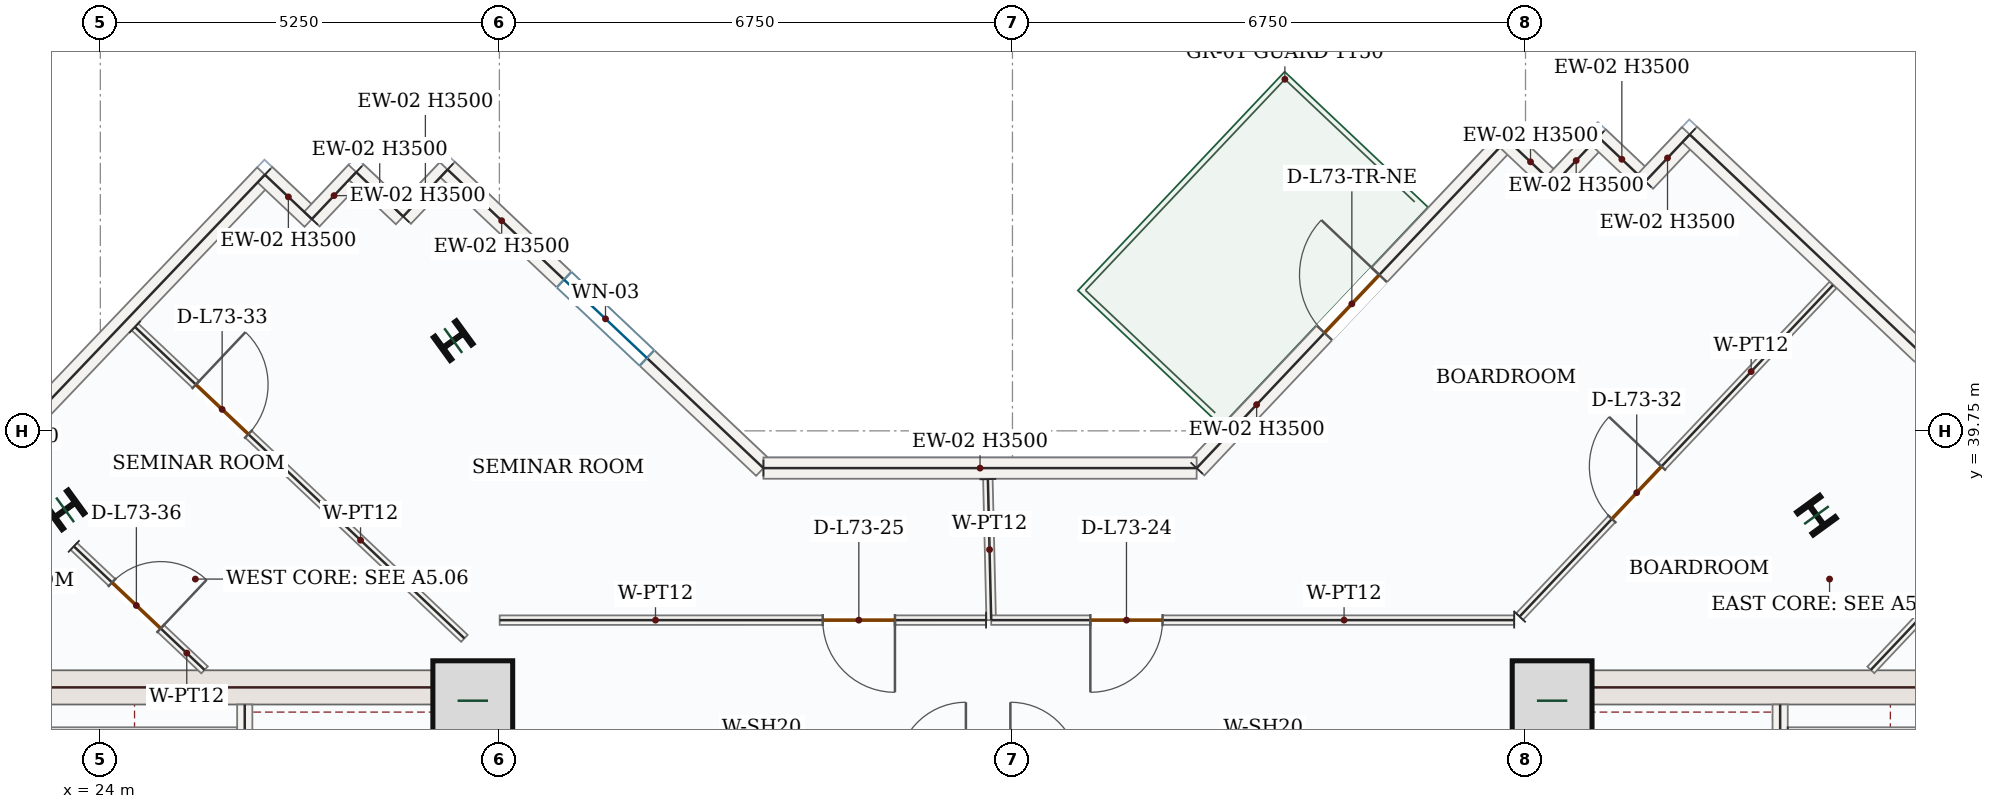
"""IFC4 building model, lengths in metres.
Left out: names, types, materials, properties, quantities, classifications, styles, units other than length and angle.
Written with IfcOpenShell. Run it as: python <this file> out.ifc"""

import sys

from ifc_helpers import new_model, si_unit, direction, frame, frame_2d, origin, origin_2d, place, context, subcontext, project, spatial, rectangle, i_section, extrude, source, transform, mapped, element, fill, save


model = new_model("IFC4")
c1 = context("Model", 3, precision=1e-05, world=origin(), true_north=direction((0.0, 1.0)))
c2 = subcontext(c1, "Body", "Model", "MODEL_VIEW")
j1 = project(units=[si_unit("LENGTHUNIT", "METRE"), si_unit("PLANEANGLEUNIT", "RADIAN")], contexts=[c1])
p1 = place(None, origin())
s1 = spatial("IfcSite", under=j1, at=p1, CompositionType="ELEMENT")
p2 = place(p1, origin())
s2 = spatial("IfcBuilding", under=s1, at=p2, CompositionType="ELEMENT")
p3 = place(p2, frame((0.0, 0.0, 302.85)))
s3 = spatial("IfcBuildingStorey", under=s2, at=p3, CompositionType="ELEMENT", Elevation=302.85)
p4 = place(p3, frame((29.025, 28.05, 0.0), z_axis=(0.0, 0.0, 1.0), x_axis=(0.0, 1.0, 0.0)))
e1 = element("IfcWall", 1, at=p4, inside=s3, PredefinedType="SHEAR", context=c2, shape_type="SweptSolid", body=[
    extrude(rectangle(XDim=8.55, YDim=0.45, at=frame_2d((4.275, 0.0))), origin(), (0.0, 0.0, 1.0), 3.5),
])
p5 = place(p4, frame((1.5, 0.0, 0.0)))
e2 = element("IfcOpeningElement", 2, at=p5, cuts=e1, PredefinedType="OPENING", context=c2, shape_type="SweptSolid", body=[
    extrude(rectangle(XDim=1.1, YDim=2.2, at=frame_2d((0.55, 1.1))), frame((0.0, 0.235, 0.0), z_axis=(0.0, -1.0, 0.0), x_axis=(1.0, 0.0, 0.0)), (0.0, 0.0, 1.0), 0.47),
])
m1 = source(origin(), c2, "Body", "SweptSolid", [
    extrude(rectangle(XDim=7.1, YDim=0.45, at=frame_2d((3.55, 0.0))), origin(), (0.0, 0.0, 1.0), 3.5),
])
p6 = place(p3, frame((21.7, 36.375, 0.0), z_axis=(0.0, 0.0, 1.0), x_axis=(1.0, 0.0, 0.0)))
e3 = element("IfcWall", 3, at=p6, inside=s3, PredefinedType="SHEAR", context=c2, shape_type="MappedRepresentation", body=[
    mapped(m1, transform((0.0, 0.0, 0.0), x_axis=(1.0, 0.0, 0.0), y_axis=(0.0, 1.0, 0.0), z_axis=(0.0, 0.0, 1.0), scale=1.0)),
])
p7 = place(p3, frame((42.975, 28.05, 0.0), z_axis=(0.0, 0.0, 1.0), x_axis=(0.0, 1.0, 0.0)))
e4 = element("IfcWall", 4, at=p7, inside=s3, PredefinedType="SHEAR", context=c2, shape_type="SweptSolid", body=[
    extrude(rectangle(XDim=8.55, YDim=0.45, at=frame_2d((4.275, 0.0))), origin(), (0.0, 0.0, 1.0), 3.5),
])
p8 = place(p7, frame((1.5, 0.0, 0.0)))
e5 = element("IfcOpeningElement", 5, at=p8, cuts=e4, PredefinedType="OPENING", context=c2, shape_type="SweptSolid", body=[
    extrude(rectangle(XDim=1.1, YDim=2.2, at=frame_2d((0.55, 1.1))), frame((0.0, 0.235, 0.0), z_axis=(0.0, -1.0, 0.0), x_axis=(1.0, 0.0, 0.0)), (0.0, 0.0, 1.0), 0.47),
])
p9 = place(p3, frame((43.2, 36.375, 0.0), z_axis=(0.0, 0.0, 1.0), x_axis=(1.0, 0.0, 0.0)))
e6 = element("IfcWall", 6, at=p9, inside=s3, PredefinedType="SHEAR", context=c2, shape_type="MappedRepresentation", body=[
    mapped(m1, transform((0.0, 0.0, 0.0), x_axis=(1.0, 0.0, 0.0), y_axis=(0.0, 1.0, 0.0), z_axis=(0.0, 0.0, 1.0), scale=1.0)),
])
m2 = source(origin(), c2, "Body", "SweptSolid", [
    extrude(rectangle(XDim=1.05, YDim=1.05, at=origin_2d()), origin(), (0.0, 0.0, 1.0), 3.75),
])
for number, where, z_axis, x_axis in (
    (7, (28.9, 36.2, 0.0), (0.0, 0.0, 1.0), (1.0, 0.0, 0.0)),
    (8, (43.1, 36.2, 0.0), (0.0, 0.0, 1.0), (1.0, 0.0, 0.0)),
):
    element("IfcColumn", number, at=place(p3, frame(where, z_axis=z_axis, x_axis=x_axis)), inside=s3, PredefinedType="COLUMN", context=c2, shape_type="MappedRepresentation", body=[
        mapped(m2, transform((0.0, 0.0, 0.0), x_axis=(1.0, 0.0, 0.0), y_axis=(0.0, 1.0, 0.0), z_axis=(0.0, 0.0, 1.0), scale=1.0)),
    ])
m3 = source(origin(), c2, "Body", "SweptSolid", [
    extrude(i_section(OverallWidth=0.374, OverallDepth=0.372, WebThickness=0.016, FlangeThickness=0.026, FilletRadius=0.018, at=origin_2d()), origin(), (0.0, 0.0, 1.0), 3.75),
])
for number, where, z_axis, x_axis in (
    (9, (46.578, 38.641, 0.0), (0.0, 0.0, 1.0), (0.809, 0.588, 0.0)),
    (10, (28.643, 40.937, 0.0), (0.0, 0.0, 1.0), (-0.588, 0.809, 0.0)),
    (11, (23.536, 38.711, 0.0), (0.0, 0.0, 1.0), (-0.588, 0.809, 0.0)),
):
    element("IfcColumn", number, at=place(p3, frame(where, z_axis=z_axis, x_axis=x_axis)), inside=s3, PredefinedType="COLUMN", context=c2, shape_type="MappedRepresentation", body=[
        mapped(m3, transform((0.0, 0.0, 0.0), x_axis=(1.0, 0.0, 0.0), y_axis=(0.0, 1.0, 0.0), z_axis=(0.0, 0.0, 1.0), scale=1.0)),
    ])
p10 = place(p3, frame((38.423, 39.26, 0.0), z_axis=(0.0, 0.0, 1.0), x_axis=(0.686888766374, 0.72676256276, 0.0)))
e12 = element("IfcWall", 12, at=p10, inside=s3, PredefinedType="SOLIDWALL", context=c2, shape_type="SweptSolid", body=[
    extrude(rectangle(XDim=5.945, YDim=0.28, at=frame_2d((2.973, 0.0))), origin(), (0.0, 0.0, 1.0), 3.5),
])
p11 = place(p10, frame((2.448, 0.0, 0.0)))
e13 = element("IfcOpeningElement", 13, at=p11, cuts=e12, PredefinedType="OPENING", context=c2, shape_type="SweptSolid", body=[
    extrude(rectangle(XDim=1.05, YDim=2.15, at=frame_2d((0.525, 1.075))), frame((0.0, 0.15, 0.0), z_axis=(0.0, -1.0, 0.0), x_axis=(1.0, 0.0, 0.0)), (0.0, 0.0, 1.0), 0.3),
])
m4 = source(origin(), c2, "Body", "SweptSolid", [
    extrude(rectangle(XDim=0.85, YDim=0.28, at=frame_2d((0.425, 0.0))), origin(), (0.0, 0.0, 1.0), 3.5),
])
p12 = place(p3, frame((42.507, 43.581, 0.0), z_axis=(0.0, 0.0, 1.0), x_axis=(0.726790047388, -0.686859685101, 0.0)))
e14 = element("IfcWall", 14, at=p12, inside=s3, PredefinedType="SOLIDWALL", context=c2, shape_type="MappedRepresentation", body=[
    mapped(m4, transform((0.0, 0.0, 0.0), x_axis=(1.0, 0.0, 0.0), y_axis=(0.0, 1.0, 0.0), z_axis=(0.0, 0.0, 1.0), scale=1.0)),
])
m5 = source(origin(), c2, "Body", "SweptSolid", [
    extrude(rectangle(XDim=0.85, YDim=0.28, at=frame_2d((0.425, 0.0))), origin(), (0.0, 0.0, 1.0), 3.5),
])
p13 = place(p3, frame((43.125, 42.997, 0.0), z_axis=(0.0, 0.0, 1.0), x_axis=(0.687011382404, 0.726646654466, 0.0)))
e15 = element("IfcWall", 15, at=p13, inside=s3, PredefinedType="SOLIDWALL", context=c2, shape_type="MappedRepresentation", body=[
    mapped(m5, transform((0.0, 0.0, 0.0), x_axis=(1.0, 0.0, 0.0), y_axis=(0.0, 1.0, 0.0), z_axis=(0.0, 0.0, 1.0), scale=1.0)),
])
p14 = place(p3, frame((43.708, 43.615, 0.0), z_axis=(0.0, 0.0, 1.0), x_axis=(0.726790047388, -0.686859685101, 0.0)))
e16 = element("IfcWall", 16, at=p14, inside=s3, PredefinedType="SOLIDWALL", context=c2, shape_type="MappedRepresentation", body=[
    mapped(m4, transform((0.0, 0.0, 0.0), x_axis=(1.0, 0.0, 0.0), y_axis=(0.0, 1.0, 0.0), z_axis=(0.0, 0.0, 1.0), scale=1.0)),
])
p15 = place(p3, frame((44.326, 43.031, 0.0), z_axis=(0.0, 0.0, 1.0), x_axis=(0.687011382404, 0.726646654466, 0.0)))
e17 = element("IfcWall", 17, at=p15, inside=s3, PredefinedType="SOLIDWALL", context=c2, shape_type="MappedRepresentation", body=[
    mapped(m5, transform((0.0, 0.0, 0.0), x_axis=(1.0, 0.0, 0.0), y_axis=(0.0, 1.0, 0.0), z_axis=(0.0, 0.0, 1.0), scale=1.0)),
])
p16 = place(p3, frame((44.91, 43.649, 0.0), z_axis=(0.0, 0.0, 1.0), x_axis=(0.726772856404, -0.686877875022, 0.0)))
e18 = element("IfcWall", 18, at=p16, inside=s3, PredefinedType="SOLIDWALL", context=c2, shape_type="SweptSolid", body=[
    extrude(rectangle(XDim=9.92, YDim=0.28, at=frame_2d((4.96, 0.0))), origin(), (0.0, 0.0, 1.0), 3.5),
])
p17 = place(p16, frame((4.21, 0.0, 0.85)))
e19 = element("IfcOpeningElement", 19, at=p17, cuts=e18, PredefinedType="OPENING", context=c2, shape_type="SweptSolid", body=[
    extrude(rectangle(XDim=1.5, YDim=1.5, at=frame_2d((0.75, 0.75))), frame((0.0, 0.15, 0.0), z_axis=(0.0, -1.0, 0.0), x_axis=(1.0, 0.0, 0.0)), (0.0, 0.0, 1.0), 0.3),
])
m6 = source(origin(), c2, "Body", "SweptSolid", [
    extrude(rectangle(XDim=10.47, YDim=0.28, at=frame_2d((5.235, 0.0))), origin(), (0.0, 0.0, 1.0), 3.5),
])
p18 = place(p3, frame((18.94, 35.542, 0.0), z_axis=(0.0, 0.0, 1.0), x_axis=(0.690070788875, 0.723741878256, 0.0)))
e20 = element("IfcWall", 20, at=p18, inside=s3, PredefinedType="SOLIDWALL", context=c2, shape_type="MappedRepresentation", body=[
    mapped(m6, transform((0.0, 0.0, 0.0), x_axis=(1.0, 0.0, 0.0), y_axis=(0.0, 1.0, 0.0), z_axis=(0.0, 0.0, 1.0), scale=1.0)),
])
p19 = place(p3, frame((26.165, 43.12, 0.0), z_axis=(0.0, 0.0, 1.0), x_axis=(0.726790047388, -0.686859685101, 0.0)))
e21 = element("IfcWall", 21, at=p19, inside=s3, PredefinedType="SOLIDWALL", context=c2, shape_type="MappedRepresentation", body=[
    mapped(m4, transform((0.0, 0.0, 0.0), x_axis=(1.0, 0.0, 0.0), y_axis=(0.0, 1.0, 0.0), z_axis=(0.0, 0.0, 1.0), scale=1.0)),
])
p20 = place(p3, frame((26.783, 42.536, 0.0), z_axis=(0.0, 0.0, 1.0), x_axis=(0.687011382404, 0.726646654466, 0.0)))
e22 = element("IfcWall", 22, at=p20, inside=s3, PredefinedType="SOLIDWALL", context=c2, shape_type="MappedRepresentation", body=[
    mapped(m5, transform((0.0, 0.0, 0.0), x_axis=(1.0, 0.0, 0.0), y_axis=(0.0, 1.0, 0.0), z_axis=(0.0, 0.0, 1.0), scale=1.0)),
])
p21 = place(p3, frame((27.367, 43.154, 0.0), z_axis=(0.0, 0.0, 1.0), x_axis=(0.726790047388, -0.686859685101, 0.0)))
e23 = element("IfcWall", 23, at=p21, inside=s3, PredefinedType="SOLIDWALL", context=c2, shape_type="MappedRepresentation", body=[
    mapped(m4, transform((0.0, 0.0, 0.0), x_axis=(1.0, 0.0, 0.0), y_axis=(0.0, 1.0, 0.0), z_axis=(0.0, 0.0, 1.0), scale=1.0)),
])
p22 = place(p3, frame((27.984, 42.57, 0.0), z_axis=(0.0, 0.0, 1.0), x_axis=(0.687011382404, 0.726646654466, 0.0)))
e24 = element("IfcWall", 24, at=p22, inside=s3, PredefinedType="SOLIDWALL", context=c2, shape_type="MappedRepresentation", body=[
    mapped(m5, transform((0.0, 0.0, 0.0), x_axis=(1.0, 0.0, 0.0), y_axis=(0.0, 1.0, 0.0), z_axis=(0.0, 0.0, 1.0), scale=1.0)),
])
p23 = place(p3, frame((28.568, 43.188, 0.0), z_axis=(0.0, 0.0, 1.0), x_axis=(0.726765623086, -0.686885528382, 0.0)))
e25 = element("IfcWall", 25, at=p23, inside=s3, PredefinedType="SOLIDWALL", context=c2, shape_type="SweptSolid", body=[
    extrude(rectangle(XDim=5.718, YDim=0.28, at=frame_2d((2.859, 0.0))), origin(), (0.0, 0.0, 1.0), 3.5),
])
p24 = place(p23, frame((2.109, 0.0, 0.85)))
e26 = element("IfcOpeningElement", 26, at=p24, cuts=e25, PredefinedType="OPENING", context=c2, shape_type="SweptSolid", body=[
    extrude(rectangle(XDim=1.5, YDim=1.5, at=frame_2d((0.75, 0.75))), frame((0.0, 0.15, 0.0), z_axis=(0.0, -1.0, 0.0), x_axis=(1.0, 0.0, 0.0)), (0.0, 0.0, 1.0), 0.3),
])
m7 = source(origin(), c2, "Body", "SweptSolid", [
    extrude(rectangle(XDim=5.699, YDim=0.28, at=frame_2d((2.85, 0.0))), origin(), (0.0, 0.0, 1.0), 3.5),
])
p25 = place(p3, frame((32.724, 39.26, 0.0), z_axis=(0.0, 0.0, 1.0), x_axis=(1.0, 0.0, 0.0)))
e27 = element("IfcWall", 27, at=p25, inside=s3, PredefinedType="SOLIDWALL", context=c2, shape_type="MappedRepresentation", body=[
    mapped(m7, transform((0.0, 0.0, 0.0), x_axis=(1.0, 0.0, 0.0), y_axis=(0.0, 1.0, 0.0), z_axis=(0.0, 0.0, 1.0), scale=1.0)),
])
p26 = place(p3, frame((25.9, 28.15, 0.0), z_axis=(0.0, 0.0, 1.0), x_axis=(0.0, 1.0, 0.0)))
e28 = element("IfcWall", 28, at=p26, inside=s3, PredefinedType="SOLIDWALL", context=c2, shape_type="SweptSolid", body=[
    extrude(rectangle(XDim=8.0, YDim=0.2, at=frame_2d((4.0, 0.0))), origin(), (0.0, 0.0, 1.0), 3.5),
])
p27 = place(p26, frame((0.4, 0.0, 0.0)))
e29 = element("IfcOpeningElement", 29, at=p27, cuts=e28, PredefinedType="OPENING", context=c2, shape_type="SweptSolid", body=[
    extrude(rectangle(XDim=1.05, YDim=2.15, at=frame_2d((0.525, 1.075))), frame((0.0, 0.11, 0.0), z_axis=(0.0, -1.0, 0.0), x_axis=(1.0, 0.0, 0.0)), (0.0, 0.0, 1.0), 0.22),
])
p28 = place(p3, frame((46.1, 28.15, 0.0), z_axis=(0.0, 0.0, 1.0), x_axis=(0.0, 1.0, 0.0)))
e30 = element("IfcWall", 30, at=p28, inside=s3, PredefinedType="SOLIDWALL", context=c2, shape_type="SweptSolid", body=[
    extrude(rectangle(XDim=8.0, YDim=0.2, at=frame_2d((4.0, 0.0))), origin(), (0.0, 0.0, 1.0), 3.5),
])
p29 = place(p28, frame((0.4, 0.0, 0.0)))
e31 = element("IfcOpeningElement", 31, at=p29, cuts=e30, PredefinedType="OPENING", context=c2, shape_type="SweptSolid", body=[
    extrude(rectangle(XDim=1.05, YDim=2.15, at=frame_2d((0.525, 1.075))), frame((0.0, 0.11, 0.0), z_axis=(0.0, -1.0, 0.0), x_axis=(1.0, 0.0, 0.0)), (0.0, 0.0, 1.0), 0.22),
])
m8 = source(origin(), c2, "Body", "SweptSolid", [
    extrude(rectangle(XDim=3.25, YDim=0.2, at=frame_2d((1.625, 0.0))), origin(), (0.0, 0.0, 1.0), 3.5),
])
for number, where, z_axis, x_axis in (
    (32, (22.55, 35.75, 0.0), (0.0, 0.0, 1.0), (1.0, 0.0, 0.0)),
    (33, (46.2, 35.75, 0.0), (0.0, 0.0, 1.0), (1.0, 0.0, 0.0)),
):
    element("IfcWall", number, at=place(p3, frame(where, z_axis=z_axis, x_axis=x_axis)), inside=s3, PredefinedType="SOLIDWALL", context=c2, shape_type="MappedRepresentation", body=[
        mapped(m8, transform((0.0, 0.0, 0.0), x_axis=(1.0, 0.0, 0.0), y_axis=(0.0, 1.0, 0.0), z_axis=(0.0, 0.0, 1.0), scale=1.0)),
    ])
p30 = place(p3, frame((23.651, 38.231, 0.0), z_axis=(0.0, 0.0, 1.0), x_axis=(0.726735597886, -0.686917295433, 0.0)))
e34 = element("IfcWall", 34, at=p30, inside=s3, PredefinedType="PARTITIONING", context=c2, shape_type="SweptSolid", body=[
    extrude(rectangle(XDim=2.367, YDim=0.125, at=frame_2d((1.183, 0.0))), origin(), (0.0, 0.0, 1.0), 3.5),
])
p31 = place(p30, frame((0.692, 0.0, 0.0)))
e35 = element("IfcOpeningElement", 35, at=p31, cuts=e34, PredefinedType="OPENING", context=c2, shape_type="SweptSolid", body=[
    extrude(rectangle(XDim=0.88, YDim=2.1, at=frame_2d((0.44, 1.05))), frame((0.0, 0.073, 0.0), z_axis=(0.0, -1.0, 0.0), x_axis=(1.0, 0.0, 0.0)), (0.0, 0.0, 1.0), 0.145),
])
p32 = place(p3, frame((24.456, 41.117, 0.0), z_axis=(0.0, 0.0, 1.0), x_axis=(0.726761082497, -0.686890332562, 0.0)))
e36 = element("IfcWall", 36, at=p32, inside=s3, PredefinedType="PARTITIONING", context=c2, shape_type="SweptSolid", body=[
    extrude(rectangle(XDim=5.964, YDim=0.125, at=frame_2d((2.982, 0.0))), origin(), (0.0, 0.0, 1.0), 3.5),
])
p33 = place(p32, frame((1.103, 0.0, 0.0)))
e37 = element("IfcOpeningElement", 37, at=p33, cuts=e36, PredefinedType="OPENING", context=c2, shape_type="SweptSolid", body=[
    extrude(rectangle(XDim=0.95, YDim=2.15, at=frame_2d((0.475, 1.075))), frame((0.0, 0.073, 0.0), z_axis=(0.0, -1.0, 0.0), x_axis=(1.0, 0.0, 0.0)), (0.0, 0.0, 1.0), 0.145),
])
m9 = source(origin(), c2, "Body", "SweptSolid", [
    extrude(rectangle(XDim=3.337, YDim=0.125, at=frame_2d((1.669, 0.0))), origin(), (0.0, 0.0, 1.0), 3.5),
])
p34 = place(p3, frame((49.585, 39.031, 0.0), z_axis=(0.0, 0.0, 1.0), x_axis=(-0.686891986515, -0.726759519278, 0.0)))
e38 = element("IfcWall", 38, at=p34, inside=s3, PredefinedType="PARTITIONING", context=c2, shape_type="MappedRepresentation", body=[
    mapped(m9, transform((0.0, 0.0, 0.0), x_axis=(1.0, 0.0, 0.0), y_axis=(0.0, 1.0, 0.0), z_axis=(0.0, 0.0, 1.0), scale=1.0)),
])
p35 = place(p3, frame((42.672, 37.306, 0.0), z_axis=(0.0, 0.0, 1.0), x_axis=(0.686871949206, 0.726778456886, 0.0)))
e39 = element("IfcWall", 39, at=p35, inside=s3, PredefinedType="PARTITIONING", context=c2, shape_type="SweptSolid", body=[
    extrude(rectangle(XDim=6.001, YDim=0.125, at=frame_2d((3.001, 0.0))), origin(), (0.0, 0.0, 1.0), 3.5),
])
p36 = place(p35, frame((1.768, 0.0, 0.0)))
e40 = element("IfcOpeningElement", 40, at=p36, cuts=e39, PredefinedType="OPENING", context=c2, shape_type="SweptSolid", body=[
    extrude(rectangle(XDim=0.95, YDim=2.15, at=frame_2d((0.475, 1.075))), frame((0.0, 0.073, 0.0), z_axis=(0.0, -1.0, 0.0), x_axis=(1.0, 0.0, 0.0)), (0.0, 0.0, 1.0), 0.145),
])
m10 = source(origin(), c2, "Body", "SweptSolid", [
    extrude(rectangle(XDim=1.855, YDim=0.125, at=frame_2d((0.928, 0.0))), origin(), (0.0, 0.0, 1.0), 3.5),
])
p37 = place(p3, frame((35.677, 39.115, 0.0), z_axis=(0.0, 0.0, 1.0), x_axis=(0.023420791501, -0.999725695641, 0.0)))
e41 = element("IfcWall", 41, at=p37, inside=s3, PredefinedType="PARTITIONING", context=c2, shape_type="MappedRepresentation", body=[
    mapped(m10, transform((0.0, 0.0, 0.0), x_axis=(1.0, 0.0, 0.0), y_axis=(0.0, 1.0, 0.0), z_axis=(0.0, 0.0, 1.0), scale=1.0)),
])
p38 = place(p3, frame((35.653, 37.26, 0.0), z_axis=(0.0, 0.0, 1.0), x_axis=(-0.999999997089, -7.6303842e-05, 0.0)))
e42 = element("IfcWall", 42, at=p38, inside=s3, PredefinedType="PARTITIONING", context=c2, shape_type="SweptSolid", body=[
    extrude(rectangle(XDim=6.399, YDim=0.125, at=frame_2d((3.2, 0.0))), origin(), (0.0, 0.0, 1.0), 3.5),
])
p39 = place(p38, frame((1.199, 0.0, 0.0)))
e43 = element("IfcOpeningElement", 43, at=p39, cuts=e42, PredefinedType="OPENING", context=c2, shape_type="SweptSolid", body=[
    extrude(rectangle(XDim=0.95, YDim=2.15, at=frame_2d((0.475, 1.075))), frame((0.0, 0.073, 0.0), z_axis=(0.0, -1.0, 0.0), x_axis=(1.0, 0.0, 0.0)), (0.0, 0.0, 1.0), 0.145),
])
p40 = place(p3, frame((42.601, 37.26, 0.0), z_axis=(0.0, 0.0, 1.0), x_axis=(-1.0, 0.0, 0.0)))
e44 = element("IfcWall", 44, at=p40, inside=s3, PredefinedType="PARTITIONING", context=c2, shape_type="SweptSolid", body=[
    extrude(rectangle(XDim=6.881, YDim=0.125, at=frame_2d((3.44, 0.0))), origin(), (0.0, 0.0, 1.0), 3.5),
])
p41 = place(p40, frame((4.626, 0.0, 0.0)))
e45 = element("IfcOpeningElement", 45, at=p41, cuts=e44, PredefinedType="OPENING", context=c2, shape_type="SweptSolid", body=[
    extrude(rectangle(XDim=0.95, YDim=2.15, at=frame_2d((0.475, 1.075))), frame((0.0, 0.073, 0.0), z_axis=(0.0, -1.0, 0.0), x_axis=(1.0, 0.0, 0.0)), (0.0, 0.0, 1.0), 0.145),
])
m11 = source(origin(), c2, "Body", "SweptSolid", [
    extrude(rectangle(XDim=1.05, YDim=2.15, at=frame_2d((0.525, 1.075))), frame((0.0, 0.025, 0.0), z_axis=(0.0, -1.0, 0.0), x_axis=(1.0, 0.0, 0.0)), (0.0, 0.0, 1.0), 0.05),
])
p42 = place(p11, origin())
e46 = element("IfcDoor", 46, at=p42, inside=s3, OperationType="SINGLE_SWING_RIGHT", PredefinedType="DOOR", context=c2, shape_type="MappedRepresentation", body=[
    mapped(m11, transform((0.0, 0.0, 0.0), x_axis=(1.0, 0.0, 0.0), y_axis=(0.0, 1.0, 0.0), z_axis=(0.0, 0.0, 1.0), scale=1.0)),
])
fill(e13, e46)
m12 = source(origin(), c2, "Body", "SweptSolid", [
    extrude(rectangle(XDim=1.5, YDim=1.5, at=frame_2d((0.75, 0.75))), frame((0.0, 0.03, 0.0), z_axis=(0.0, -1.0, 0.0), x_axis=(1.0, 0.0, 0.0)), (0.0, 0.0, 1.0), 0.06),
])
p43 = place(p24, origin())
e47 = element("IfcWindow", 47, at=p43, inside=s3, PartitioningType="SINGLE_PANEL", PredefinedType="WINDOW", context=c2, shape_type="MappedRepresentation", body=[
    mapped(m12, transform((0.0, 0.0, 0.0), x_axis=(1.0, 0.0, 0.0), y_axis=(0.0, 1.0, 0.0), z_axis=(0.0, 0.0, 1.0), scale=1.0)),
])
fill(e26, e47)
m13 = source(origin(), c2, "Body", "SweptSolid", [
    extrude(rectangle(XDim=0.95, YDim=2.15, at=frame_2d((0.475, 1.075))), frame((0.0, 0.025, 0.0), z_axis=(0.0, -1.0, 0.0), x_axis=(1.0, 0.0, 0.0)), (0.0, 0.0, 1.0), 0.05),
])
p44 = place(p41, origin())
e48 = element("IfcDoor", 48, at=p44, inside=s3, OperationType="SINGLE_SWING_RIGHT", PredefinedType="DOOR", context=c2, shape_type="MappedRepresentation", body=[
    mapped(m13, transform((0.0, 0.0, 0.0), x_axis=(1.0, 0.0, 0.0), y_axis=(0.0, 1.0, 0.0), z_axis=(0.0, 0.0, 1.0), scale=1.0)),
])
fill(e45, e48)
p45 = place(p39, origin())
e49 = element("IfcDoor", 49, at=p45, inside=s3, OperationType="SINGLE_SWING_LEFT", PredefinedType="DOOR", context=c2, shape_type="MappedRepresentation", body=[
    mapped(m13, transform((0.0, 0.0, 0.0), x_axis=(1.0, 0.0, 0.0), y_axis=(0.0, 1.0, 0.0), z_axis=(0.0, 0.0, 1.0), scale=1.0)),
])
fill(e43, e49)
p46 = place(p36, origin())
e50 = element("IfcDoor", 50, at=p46, inside=s3, OperationType="SINGLE_SWING_RIGHT", PredefinedType="DOOR", context=c2, shape_type="MappedRepresentation", body=[
    mapped(m13, transform((0.0, 0.0, 0.0), x_axis=(1.0, 0.0, 0.0), y_axis=(0.0, 1.0, 0.0), z_axis=(0.0, 0.0, 1.0), scale=1.0)),
])
fill(e40, e50)
p47 = place(p33, origin())
e51 = element("IfcDoor", 51, at=p47, inside=s3, OperationType="SINGLE_SWING_LEFT", PredefinedType="DOOR", context=c2, shape_type="MappedRepresentation", body=[
    mapped(m13, transform((0.0, 0.0, 0.0), x_axis=(1.0, 0.0, 0.0), y_axis=(0.0, 1.0, 0.0), z_axis=(0.0, 0.0, 1.0), scale=1.0)),
])
fill(e37, e51)
m14 = source(origin(), c2, "Body", "SweptSolid", [
    extrude(rectangle(XDim=0.88, YDim=2.1, at=frame_2d((0.44, 1.05))), frame((0.0, 0.025, 0.0), z_axis=(0.0, -1.0, 0.0), x_axis=(1.0, 0.0, 0.0)), (0.0, 0.0, 1.0), 0.05),
])
p48 = place(p31, origin())
e52 = element("IfcDoor", 52, at=p48, inside=s3, OperationType="SINGLE_SWING_RIGHT", PredefinedType="DOOR", context=c2, shape_type="MappedRepresentation", body=[
    mapped(m14, transform((0.0, 0.0, 0.0), x_axis=(1.0, 0.0, 0.0), y_axis=(0.0, 1.0, 0.0), z_axis=(0.0, 0.0, 1.0), scale=1.0)),
])
fill(e35, e52)
save(model, sys.argv[1])
